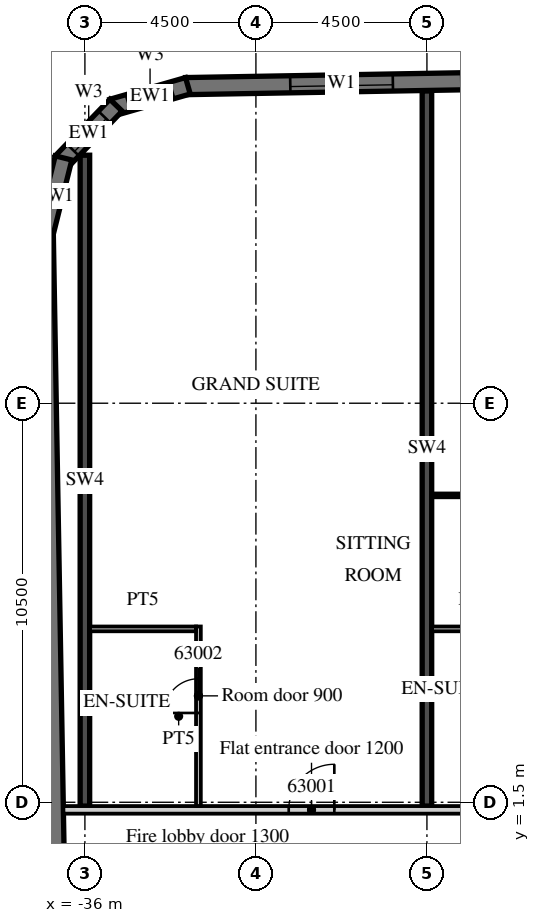
"""IFC4 building model, lengths in metres.
Left out: names, types, materials, properties, quantities, classifications, styles, units other than length and angle.
Written with IfcOpenShell. Run it as: python <this file> out.ifc"""

import sys

from ifc_helpers import new_model, si_unit, direction, frame, frame_2d, origin, place, context, subcontext, project, spatial, polyline, rectangle, outline, extrude, element, fill, save


model = new_model("IFC4")
c1 = context("Model", 3, precision=1e-05, world=origin(), true_north=direction((0.0, 1.0)))
c2 = subcontext(c1, "Body", "Model", "MODEL_VIEW")
j1 = project(units=[si_unit("LENGTHUNIT", "METRE"), si_unit("PLANEANGLEUNIT", "RADIAN")], contexts=[c1])
p1 = place(None, origin())
s1 = spatial("IfcSite", under=j1, at=p1, CompositionType="ELEMENT")
p2 = place(p1, origin())
s2 = spatial("IfcBuilding", under=s1, at=p2, CompositionType="ELEMENT")
p3 = place(p2, frame((0.0, 0.0, 254.0)))
s3 = spatial("IfcBuildingStorey", under=s2, at=p3, CompositionType="ELEMENT", Elevation=254.0)
p4 = place(p3, frame((-36.0, 1.4, 0.0), z_axis=(0.0, 0.0, 1.0), x_axis=(0.0, 1.0, 0.0)))
e1 = element("IfcWall", 1, at=p4, inside=s3, PredefinedType="SHEAR", context=c2, shape_type="SweptSolid", body=[
    extrude(rectangle(XDim=17.125, YDim=0.25, at=frame_2d((8.563, 0.0))), origin(), (0.0, 0.0, 1.0), 3.0),
])
p5 = place(p3, frame((-27.0, 1.4, 0.0), z_axis=(0.0, 0.0, 1.0), x_axis=(0.0, 1.0, 0.0)))
e2 = element("IfcWall", 2, at=p5, inside=s3, PredefinedType="SHEAR", context=c2, shape_type="SweptSolid", body=[
    extrude(rectangle(XDim=18.817, YDim=0.25, at=frame_2d((9.409, 0.0))), origin(), (0.0, 0.0, 1.0), 3.0),
])
p6 = place(p3, frame((-37.057, 16.503, 0.0), z_axis=(0.0, 0.0, 1.0), x_axis=(0.017452279857, -0.999847697366, 0.0)))
e3 = element("IfcWall", 3, at=p6, inside=s3, PredefinedType="SOLIDWALL", context=c2, shape_type="SweptSolid", body=[
    extrude(rectangle(XDim=33.0, YDim=0.45, at=frame_2d((16.5, 0.0))), origin(), (0.0, 0.0, 1.0), 3.0),
])
p7 = place(p3, frame((13.504, 21.161, 0.0), z_axis=(0.0, 0.0, 1.0), x_axis=(-0.999847763257, -0.017448504532, 0.0)))
e4 = element("IfcWall", 4, at=p7, inside=s3, PredefinedType="SOLIDWALL", context=c2, shape_type="SweptSolid", body=[
    extrude(rectangle(XDim=46.859, YDim=0.45, at=frame_2d((23.43, 0.0))), origin(), (0.0, 0.0, 1.0), 3.0),
])
p8 = place(p7, frame((0.9, 0.0, 0.45)))
e5 = element("IfcOpeningElement", 5, at=p8, cuts=e4, PredefinedType="OPENING", context=c2, shape_type="SweptSolid", body=[
    extrude(rectangle(XDim=2.7, YDim=2.25, at=frame_2d((1.35, 1.125))), frame((0.0, 0.235, 0.0), z_axis=(0.0, -1.0, 0.0), x_axis=(1.0, 0.0, 0.0)), (0.0, 0.0, 1.0), 0.47),
])
p9 = place(p7, frame((5.401, 0.0, 0.45)))
e6 = element("IfcOpeningElement", 6, at=p9, cuts=e4, PredefinedType="OPENING", context=c2, shape_type="SweptSolid", body=[
    extrude(rectangle(XDim=2.7, YDim=2.25, at=frame_2d((1.35, 1.125))), frame((0.0, 0.235, 0.0), z_axis=(0.0, -1.0, 0.0), x_axis=(1.0, 0.0, 0.0)), (0.0, 0.0, 1.0), 0.47),
])
p10 = place(p7, frame((9.902, 0.0, 0.45)))
e7 = element("IfcOpeningElement", 7, at=p10, cuts=e4, PredefinedType="OPENING", context=c2, shape_type="SweptSolid", body=[
    extrude(rectangle(XDim=2.7, YDim=2.25, at=frame_2d((1.35, 1.125))), frame((0.0, 0.235, 0.0), z_axis=(0.0, -1.0, 0.0), x_axis=(1.0, 0.0, 0.0)), (0.0, 0.0, 1.0), 0.47),
])
p11 = place(p7, frame((14.402, 0.0, 0.45)))
e8 = element("IfcOpeningElement", 8, at=p11, cuts=e4, PredefinedType="OPENING", context=c2, shape_type="SweptSolid", body=[
    extrude(rectangle(XDim=2.7, YDim=2.25, at=frame_2d((1.35, 1.125))), frame((0.0, 0.235, 0.0), z_axis=(0.0, -1.0, 0.0), x_axis=(1.0, 0.0, 0.0)), (0.0, 0.0, 1.0), 0.47),
])
p12 = place(p7, frame((18.903, 0.0, 0.45)))
e9 = element("IfcOpeningElement", 9, at=p12, cuts=e4, PredefinedType="OPENING", context=c2, shape_type="SweptSolid", body=[
    extrude(rectangle(XDim=2.7, YDim=2.25, at=frame_2d((1.35, 1.125))), frame((0.0, 0.235, 0.0), z_axis=(0.0, -1.0, 0.0), x_axis=(1.0, 0.0, 0.0)), (0.0, 0.0, 1.0), 0.47),
])
p13 = place(p7, frame((23.404, 0.0, 0.45)))
e10 = element("IfcOpeningElement", 10, at=p13, cuts=e4, PredefinedType="OPENING", context=c2, shape_type="SweptSolid", body=[
    extrude(rectangle(XDim=2.7, YDim=2.25, at=frame_2d((1.35, 1.125))), frame((0.0, 0.235, 0.0), z_axis=(0.0, -1.0, 0.0), x_axis=(1.0, 0.0, 0.0)), (0.0, 0.0, 1.0), 0.47),
])
p14 = place(p7, frame((27.904, 0.0, 0.45)))
e11 = element("IfcOpeningElement", 11, at=p14, cuts=e4, PredefinedType="OPENING", context=c2, shape_type="SweptSolid", body=[
    extrude(rectangle(XDim=2.7, YDim=2.25, at=frame_2d((1.35, 1.125))), frame((0.0, 0.235, 0.0), z_axis=(0.0, -1.0, 0.0), x_axis=(1.0, 0.0, 0.0)), (0.0, 0.0, 1.0), 0.47),
])
p15 = place(p7, frame((32.405, 0.0, 0.45)))
e12 = element("IfcOpeningElement", 12, at=p15, cuts=e4, PredefinedType="OPENING", context=c2, shape_type="SweptSolid", body=[
    extrude(rectangle(XDim=2.7, YDim=2.25, at=frame_2d((1.35, 1.125))), frame((0.0, 0.235, 0.0), z_axis=(0.0, -1.0, 0.0), x_axis=(1.0, 0.0, 0.0)), (0.0, 0.0, 1.0), 0.47),
])
p16 = place(p7, frame((36.906, 0.0, 0.45)))
e13 = element("IfcOpeningElement", 13, at=p16, cuts=e4, PredefinedType="OPENING", context=c2, shape_type="SweptSolid", body=[
    extrude(rectangle(XDim=2.7, YDim=2.25, at=frame_2d((1.35, 1.125))), frame((0.0, 0.235, 0.0), z_axis=(0.0, -1.0, 0.0), x_axis=(1.0, 0.0, 0.0)), (0.0, 0.0, 1.0), 0.47),
])
p17 = place(p7, frame((41.406, 0.0, 0.45)))
e14 = element("IfcOpeningElement", 14, at=p17, cuts=e4, PredefinedType="OPENING", context=c2, shape_type="SweptSolid", body=[
    extrude(rectangle(XDim=2.7, YDim=2.25, at=frame_2d((1.35, 1.125))), frame((0.0, 0.235, 0.0), z_axis=(0.0, -1.0, 0.0), x_axis=(1.0, 0.0, 0.0)), (0.0, 0.0, 1.0), 0.47),
])
p18 = place(p3, frame((-33.29, 20.352, 0.0), z_axis=(0.0, 0.0, 1.0), x_axis=(-0.961247584925, -0.275686562016, 0.0)))
e15 = element("IfcWall", 15, at=p18, inside=s3, PredefinedType="SOLIDWALL", context=c2, shape_type="SweptSolid", body=[
    extrude(outline(polyline([(0.0, -0.225), (2.071, -0.225), (1.95, 0.225), (0.121, 0.225), (0.0, -0.225)])), origin(), (0.0, 0.0, 1.0), 3.0),
])
p19 = place(p18, frame((0.435, 0.0, 0.45)))
e16 = element("IfcOpeningElement", 16, at=p19, cuts=e15, PredefinedType="OPENING", context=c2, shape_type="SweptSolid", body=[
    extrude(rectangle(XDim=1.2, YDim=2.25, at=frame_2d((0.6, 1.125))), frame((0.0, 0.235, 0.0), z_axis=(0.0, -1.0, 0.0), x_axis=(1.0, 0.0, 0.0)), (0.0, 0.0, 1.0), 0.47),
])
p20 = place(p3, frame((-35.181, 19.842, 0.0), z_axis=(0.0, 0.0, 1.0), x_axis=(-0.694678672846, -0.719320193998, 0.0)))
e17 = element("IfcWall", 17, at=p20, inside=s3, PredefinedType="SOLIDWALL", context=c2, shape_type="SweptSolid", body=[
    extrude(outline(polyline([(0.0, -0.225), (2.071, -0.225), (1.95, 0.225), (0.121, 0.225), (0.0, -0.225)])), origin(), (0.0, 0.0, 1.0), 3.0),
])
p21 = place(p20, frame((0.435, 0.0, 0.45)))
e18 = element("IfcOpeningElement", 18, at=p21, cuts=e17, PredefinedType="OPENING", context=c2, shape_type="SweptSolid", body=[
    extrude(rectangle(XDim=1.2, YDim=2.25, at=frame_2d((0.6, 1.125))), frame((0.0, 0.235, 0.0), z_axis=(0.0, -1.0, 0.0), x_axis=(1.0, 0.0, 0.0)), (0.0, 0.0, 1.0), 0.47),
])
p22 = place(p3, frame((-36.563, 18.454, 0.0), z_axis=(0.0, 0.0, 1.0), x_axis=(-0.241869623482, -0.970308757683, 0.0)))
e19 = element("IfcWall", 19, at=p22, inside=s3, PredefinedType="SOLIDWALL", context=c2, shape_type="SweptSolid", body=[
    extrude(outline(polyline([(-0.0, -0.225), (2.07, -0.225), (1.95, 0.225), (0.12, 0.225), (-0.0, -0.225)])), origin(), (0.0, 0.0, 1.0), 3.0),
])
p23 = place(p3, frame((-36.566, 1.3, 0.0), z_axis=(0.0, 0.0, 1.0), x_axis=(1.0, 0.0, 0.0)))
e20 = element("IfcWall", 20, at=p23, inside=s3, PredefinedType="PARTITIONING", context=c2, shape_type="SweptSolid", body=[
    extrude(rectangle(XDim=23.066, YDim=0.2, at=frame_2d((11.533, 0.0))), origin(), (0.0, 0.0, 1.0), 3.0),
])
p24 = place(p23, frame((5.929, 0.0, 0.0)))
e21 = element("IfcOpeningElement", 21, at=p24, cuts=e20, PredefinedType="OPENING", context=c2, shape_type="SweptSolid", body=[
    extrude(rectangle(XDim=1.2, YDim=2.1, at=frame_2d((0.6, 1.05))), frame((0.0, 0.11, 0.0), z_axis=(0.0, -1.0, 0.0), x_axis=(1.0, 0.0, 0.0)), (0.0, 0.0, 1.0), 0.22),
])
p25 = place(p23, frame((12.516, 0.0, 0.0)))
e22 = element("IfcOpeningElement", 22, at=p25, cuts=e20, PredefinedType="OPENING", context=c2, shape_type="SweptSolid", body=[
    extrude(rectangle(XDim=1.0, YDim=2.1, at=frame_2d((0.5, 1.05))), frame((0.0, 0.11, 0.0), z_axis=(0.0, -1.0, 0.0), x_axis=(1.0, 0.0, 0.0)), (0.0, 0.0, 1.0), 0.22),
])
p26 = place(p23, frame((14.616, 0.0, 0.0)))
e23 = element("IfcOpeningElement", 23, at=p26, cuts=e20, PredefinedType="OPENING", context=c2, shape_type="SweptSolid", body=[
    extrude(rectangle(XDim=1.0, YDim=2.1, at=frame_2d((0.5, 1.05))), frame((0.0, 0.11, 0.0), z_axis=(0.0, -1.0, 0.0), x_axis=(1.0, 0.0, 0.0)), (0.0, 0.0, 1.0), 0.22),
])
p27 = place(p23, frame((21.491, 0.0, 0.0)))
e24 = element("IfcOpeningElement", 24, at=p27, cuts=e20, PredefinedType="OPENING", context=c2, shape_type="SweptSolid", body=[
    extrude(rectangle(XDim=1.0, YDim=2.1, at=frame_2d((0.5, 1.05))), frame((0.0, 0.11, 0.0), z_axis=(0.0, -1.0, 0.0), x_axis=(1.0, 0.0, 0.0)), (0.0, 0.0, 1.0), 0.22),
])
p28 = place(p3, frame((-33.013, 1.4, 0.0), z_axis=(0.0, 0.0, 1.0), x_axis=(0.0, 1.0, 0.0)))
e25 = element("IfcWall", 25, at=p28, inside=s3, PredefinedType="PARTITIONING", context=c2, shape_type="SweptSolid", body=[
    extrude(rectangle(XDim=4.725, YDim=0.125, at=frame_2d((2.363, 0.0))), origin(), (0.0, 0.0, 1.0), 3.0),
])
p29 = place(p28, frame((2.45, 0.0, 0.0)))
e26 = element("IfcOpeningElement", 26, at=p29, cuts=e25, PredefinedType="OPENING", context=c2, shape_type="SweptSolid", body=[
    extrude(rectangle(XDim=0.9, YDim=2.1, at=frame_2d((0.45, 1.05))), frame((0.0, 0.073, 0.0), z_axis=(0.0, -1.0, 0.0), x_axis=(1.0, 0.0, 0.0)), (0.0, 0.0, 1.0), 0.145),
])
p30 = place(p3, frame((-35.875, 6.062, 0.0), z_axis=(0.0, 0.0, 1.0), x_axis=(1.0, 0.0, 0.0)))
e27 = element("IfcWall", 27, at=p30, inside=s3, PredefinedType="PARTITIONING", context=c2, shape_type="SweptSolid", body=[
    extrude(rectangle(XDim=2.8, YDim=0.125, at=frame_2d((1.4, 0.0))), origin(), (0.0, 0.0, 1.0), 3.0),
])
p31 = place(p3, frame((-26.875, 6.062, 0.0), z_axis=(0.0, 0.0, 1.0), x_axis=(1.0, 0.0, 0.0)))
e28 = element("IfcWall", 28, at=p31, inside=s3, PredefinedType="PARTITIONING", context=c2, shape_type="SweptSolid", body=[
    extrude(rectangle(XDim=2.25, YDim=0.125, at=frame_2d((1.125, 0.0))), origin(), (0.0, 0.0, 1.0), 3.0),
])
p32 = place(p3, frame((-26.875, 9.575, 0.0), z_axis=(0.0, 0.0, 1.0), x_axis=(1.0, 0.0, 0.0)))
e29 = element("IfcWall", 29, at=p32, inside=s3, PredefinedType="PARTITIONING", context=c2, shape_type="SweptSolid", body=[
    extrude(rectangle(XDim=4.275, YDim=0.1, at=frame_2d((2.137, 0.0))), origin(), (0.0, 0.0, 1.0), 3.0),
])
p33 = place(p32, frame((1.988, 0.0, 0.0)))
e30 = element("IfcOpeningElement", 30, at=p33, cuts=e29, PredefinedType="OPENING", context=c2, shape_type="SweptSolid", body=[
    extrude(rectangle(XDim=1.5, YDim=2.1, at=frame_2d((0.75, 1.05))), frame((0.0, 0.06, 0.0), z_axis=(0.0, -1.0, 0.0), x_axis=(1.0, 0.0, 0.0)), (0.0, 0.0, 1.0), 0.12),
])
p34 = place(p17, origin())
e31 = element("IfcWindow", 31, at=p34, inside=s3, PartitioningType="SINGLE_PANEL", PredefinedType="WINDOW", context=c2, shape_type="SweptSolid", body=[
    extrude(rectangle(XDim=2.7, YDim=2.25, at=frame_2d((1.35, 1.125))), frame((0.0, 0.09, 0.0), z_axis=(0.0, -1.0, 0.0), x_axis=(1.0, 0.0, 0.0)), (0.0, 0.0, 1.0), 0.06),
])
fill(e14, e31)
p35 = place(p19, origin())
e32 = element("IfcWindow", 32, at=p35, inside=s3, PartitioningType="SINGLE_PANEL", PredefinedType="WINDOW", context=c2, shape_type="SweptSolid", body=[
    extrude(rectangle(XDim=1.2, YDim=2.25, at=frame_2d((0.6, 1.125))), frame((0.0, 0.09, 0.0), z_axis=(0.0, -1.0, 0.0), x_axis=(1.0, 0.0, 0.0)), (0.0, 0.0, 1.0), 0.06),
])
fill(e16, e32)
p36 = place(p21, origin())
e33 = element("IfcWindow", 33, at=p36, inside=s3, PartitioningType="SINGLE_PANEL", PredefinedType="WINDOW", context=c2, shape_type="SweptSolid", body=[
    extrude(rectangle(XDim=1.2, YDim=2.25, at=frame_2d((0.6, 1.125))), frame((0.0, 0.09, 0.0), z_axis=(0.0, -1.0, 0.0), x_axis=(1.0, 0.0, 0.0)), (0.0, 0.0, 1.0), 0.06),
])
fill(e18, e33)
p37 = place(p24, origin())
e34 = element("IfcDoor", 34, at=p37, inside=s3, OperationType="SINGLE_SWING_RIGHT", PredefinedType="DOOR", context=c2, shape_type="SweptSolid", body=[
    extrude(rectangle(XDim=1.2, YDim=2.1, at=frame_2d((0.6, 1.05))), frame((0.0, 0.025, 0.0), z_axis=(0.0, -1.0, 0.0), x_axis=(1.0, 0.0, 0.0)), (0.0, 0.0, 1.0), 0.05),
])
fill(e21, e34)
p38 = place(p29, origin())
e35 = element("IfcDoor", 35, at=p38, inside=s3, OperationType="SINGLE_SWING_LEFT", PredefinedType="DOOR", context=c2, shape_type="SweptSolid", body=[
    extrude(rectangle(XDim=0.9, YDim=2.1, at=frame_2d((0.45, 1.05))), frame((0.0, 0.025, 0.0), z_axis=(0.0, -1.0, 0.0), x_axis=(1.0, 0.0, 0.0)), (0.0, 0.0, 1.0), 0.05),
])
fill(e26, e35)
save(model, sys.argv[1])
